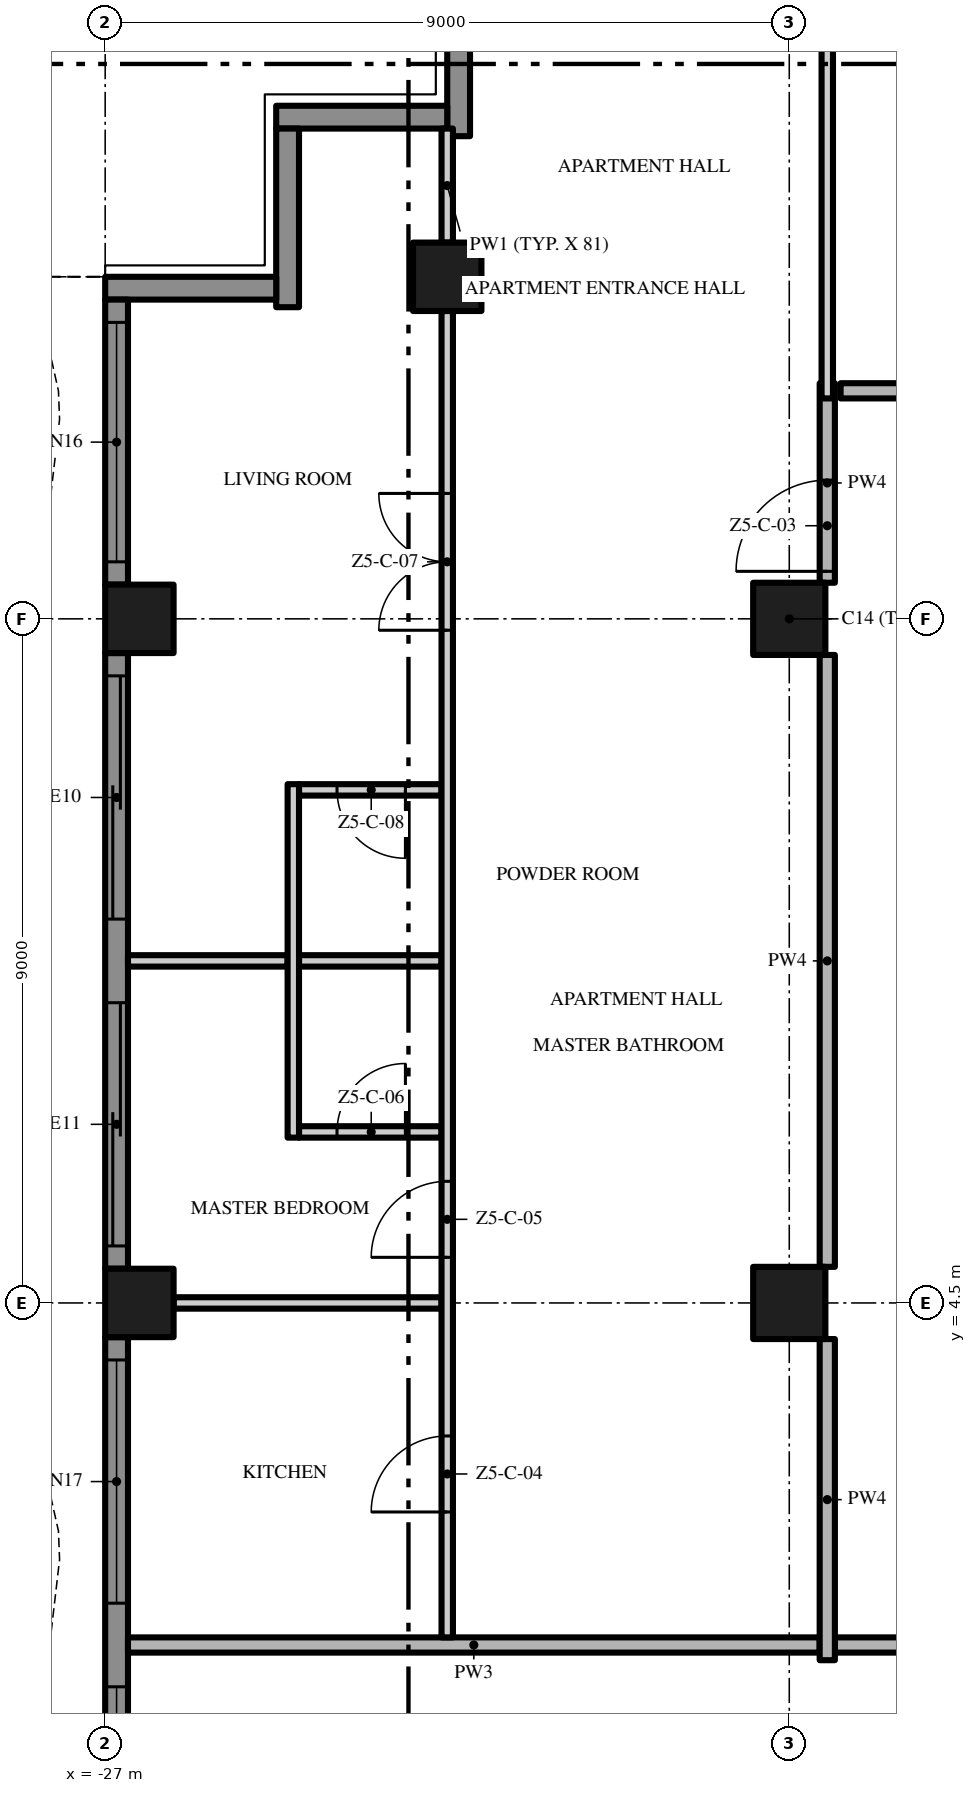
"""IFC4 building model, lengths in metres.
Left out: names, types, materials, properties, quantities, classifications, styles, units other than length and angle.
Written with IfcOpenShell. Run it as: python <this file> out.ifc"""

import sys

from ifc_helpers import new_model, si_unit, direction, frame, frame_2d, origin, origin_2d, place, context, subcontext, project, spatial, polyline, rectangle, outline, extrude, element, fill, save


model = new_model("IFC4")
c1 = context("Model", 3, precision=1e-05, world=origin(), true_north=direction((0.0, 1.0)))
c2 = subcontext(c1, "Body", "Model", "MODEL_VIEW")
j1 = project(units=[si_unit("LENGTHUNIT", "METRE"), si_unit("PLANEANGLEUNIT", "RADIAN")], contexts=[c1])
p1 = place(None, origin())
s1 = spatial("IfcSite", under=j1, at=p1, CompositionType="ELEMENT")
p2 = place(p1, origin())
s2 = spatial("IfcBuilding", under=s1, at=p2, CompositionType="ELEMENT")
p3 = place(p2, frame((0.0, 0.0, 261.6)))
s3 = spatial("IfcBuildingStorey", under=s2, at=p3, CompositionType="ELEMENT", Elevation=261.6)
for number, where, z_axis, x_axis in (
    (1, (-18.0, 13.5, 0.0), (0.0, 0.0, 1.0), (1.0, 0.0, 0.0)),
    (2, (-18.0, 4.5, 0.0), (0.0, 0.0, 1.0), (1.0, 0.0, 0.0)),
):
    element("IfcColumn", number, at=place(p3, frame(where, z_axis=z_axis, x_axis=x_axis)), inside=s3, PredefinedType="COLUMN", context=c2, shape_type="SweptSolid", body=[
        extrude(rectangle(XDim=0.95, YDim=0.95, at=origin_2d()), origin(), (0.0, 0.0, 1.0), 3.5),
    ])
for number, where, z_axis, x_axis in (
    (3, (-26.55, 13.5, 0.0), (0.0, 0.0, 1.0), (1.0, 0.0, 0.0)),
    (4, (-22.5, 18.0, 0.0), (0.0, 0.0, 1.0), (1.0, 0.0, 0.0)),
    (5, (-26.55, 4.5, 0.0), (0.0, 0.0, 1.0), (1.0, 0.0, 0.0)),
):
    element("IfcColumn", number, at=place(p3, frame(where, z_axis=z_axis, x_axis=x_axis)), inside=s3, PredefinedType="COLUMN", context=c2, shape_type="SweptSolid", body=[
        extrude(rectangle(XDim=0.9, YDim=0.9, at=origin_2d()), origin(), (0.0, 0.0, 1.0), 3.5),
    ])
p4 = place(p3, frame((-22.35, 19.85, 0.0), z_axis=(0.0, 0.0, 1.0), x_axis=(0.0, 1.0, 0.0)))
e6 = element("IfcWall", 6, at=p4, inside=s3, PredefinedType="SOLIDWALL", context=c2, shape_type="SweptSolid", body=[
    extrude(rectangle(XDim=2.35, YDim=0.3, at=frame_2d((1.175, 0.0))), origin(), (0.0, 0.0, 1.0), 3.5),
])
p5 = place(p3, frame((-24.75, 20.1, 0.0), z_axis=(0.0, 0.0, 1.0), x_axis=(1.0, 0.0, 0.0)))
e7 = element("IfcWall", 7, at=p5, inside=s3, PredefinedType="SOLIDWALL", context=c2, shape_type="SweptSolid", body=[
    extrude(rectangle(XDim=2.25, YDim=0.3, at=frame_2d((1.125, 0.0))), origin(), (0.0, 0.0, 1.0), 3.5),
])
p6 = place(p3, frame((-24.6, 17.6, 0.0), z_axis=(0.0, 0.0, 1.0), x_axis=(0.0, 1.0, 0.0)))
e8 = element("IfcWall", 8, at=p6, inside=s3, PredefinedType="SOLIDWALL", context=c2, shape_type="SweptSolid", body=[
    extrude(rectangle(XDim=2.35, YDim=0.3, at=frame_2d((1.175, 0.0))), origin(), (0.0, 0.0, 1.0), 3.5),
])
p7 = place(p3, frame((-27.0, 17.85, 0.0), z_axis=(0.0, 0.0, 1.0), x_axis=(1.0, 0.0, 0.0)))
e9 = element("IfcWall", 9, at=p7, inside=s3, PredefinedType="SOLIDWALL", context=c2, shape_type="SweptSolid", body=[
    extrude(rectangle(XDim=2.25, YDim=0.3, at=frame_2d((1.125, 0.0))), origin(), (0.0, 0.0, 1.0), 3.5),
])
p8 = place(p3, frame((-26.85, 13.95, 0.0), z_axis=(0.0, 0.0, 1.0), x_axis=(0.0, 1.0, 0.0)))
e10 = element("IfcWall", 10, at=p8, inside=s3, PredefinedType="SOLIDWALL", context=c2, shape_type="SweptSolid", body=[
    extrude(rectangle(XDim=3.75, YDim=0.3, at=frame_2d((1.875, 0.0))), origin(), (0.0, 0.0, 1.0), 3.5),
])
p9 = place(p8, frame((0.3, 0.0, 0.45)))
e11 = element("IfcOpeningElement", 11, at=p9, cuts=e10, PredefinedType="OPENING", context=c2, shape_type="SweptSolid", body=[
    extrude(rectangle(XDim=3.15, YDim=2.65, at=frame_2d((1.575, 1.325))), frame((0.0, 0.16, 0.0), z_axis=(0.0, -1.0, 0.0), x_axis=(1.0, 0.0, 0.0)), (0.0, 0.0, 1.0), 0.32),
])
p10 = place(p3, frame((-26.85, 4.95, 0.0), z_axis=(0.0, 0.0, 1.0), x_axis=(0.0, 1.0, 0.0)))
e12 = element("IfcWall", 12, at=p10, inside=s3, PredefinedType="SOLIDWALL", context=c2, shape_type="SweptSolid", body=[
    extrude(rectangle(XDim=8.1, YDim=0.3, at=frame_2d((4.05, 0.0))), origin(), (0.0, 0.0, 1.0), 3.5),
])
p11 = place(p10, frame((4.6, 0.0, 0.0)))
e13 = element("IfcOpeningElement", 13, at=p11, cuts=e12, PredefinedType="OPENING", context=c2, shape_type="SweptSolid", body=[
    extrude(rectangle(XDim=3.2, YDim=2.4, at=frame_2d((1.6, 1.2))), frame((0.0, 0.16, 0.0), z_axis=(0.0, -1.0, 0.0), x_axis=(1.0, 0.0, 0.0)), (0.0, 0.0, 1.0), 0.32),
])
p12 = place(p10, frame((0.3, 0.0, 0.0)))
e14 = element("IfcOpeningElement", 14, at=p12, cuts=e12, PredefinedType="OPENING", context=c2, shape_type="SweptSolid", body=[
    extrude(rectangle(XDim=3.2, YDim=2.4, at=frame_2d((1.6, 1.2))), frame((0.0, 0.16, 0.0), z_axis=(0.0, -1.0, 0.0), x_axis=(1.0, 0.0, 0.0)), (0.0, 0.0, 1.0), 0.32),
])
p13 = place(p3, frame((-26.85, -4.05, 0.0), z_axis=(0.0, 0.0, 1.0), x_axis=(0.0, 1.0, 0.0)))
e15 = element("IfcWall", 15, at=p13, inside=s3, PredefinedType="SOLIDWALL", context=c2, shape_type="SweptSolid", body=[
    extrude(rectangle(XDim=8.1, YDim=0.3, at=frame_2d((4.05, 0.0))), origin(), (0.0, 0.0, 1.0), 3.5),
])
p14 = place(p13, frame((4.6, 0.0, 0.45)))
e16 = element("IfcOpeningElement", 16, at=p14, cuts=e15, PredefinedType="OPENING", context=c2, shape_type="SweptSolid", body=[
    extrude(rectangle(XDim=3.2, YDim=2.65, at=frame_2d((1.6, 1.325))), frame((0.0, 0.16, 0.0), z_axis=(0.0, -1.0, 0.0), x_axis=(1.0, 0.0, 0.0)), (0.0, 0.0, 1.0), 0.32),
])
p15 = place(p13, frame((0.3, 0.0, 0.45)))
e17 = element("IfcOpeningElement", 17, at=p15, cuts=e15, PredefinedType="OPENING", context=c2, shape_type="SweptSolid", body=[
    extrude(rectangle(XDim=3.2, YDim=2.65, at=frame_2d((1.6, 1.325))), frame((0.0, 0.16, 0.0), z_axis=(0.0, -1.0, 0.0), x_axis=(1.0, 0.0, 0.0)), (0.0, 0.0, 1.0), 0.32),
])
p16 = place(p3, origin())
e18 = element("IfcWall", 18, at=p16, inside=s3, PredefinedType="USERDEFINED", context=c2, shape_type="SweptSolid", body=[
    extrude(outline(polyline([(-27.951, 18.0), (-27.615, 16.5), (-27.6, 16.125), (-27.731, 15.0), (-28.255, 13.5), (-28.988, 12.0), (-29.649, 10.5), (-29.985, 9.0), (-30.0, 8.625), (-29.869, 7.5), (-29.345, 6.0), (-28.612, 4.5), (-27.951, 3.0), (-27.615, 1.5), (-27.6, 1.125), (-27.731, 0.0), (-28.255, -1.5), (-28.988, -3.0), (-29.649, -4.5), (-29.985, -6.0), (-30.0, -6.375), (-29.869, -7.5), (-29.345, -9.0), (-28.612, -10.5), (-27.951, -12.0), (-27.615, -13.5), (-27.6, -13.875), (-27.731, -15.0), (-28.255, -16.5), (-28.988, -18.0), (-28.763, -18.11), (-28.024, -16.596), (-27.486, -15.056), (-27.349, -13.885), (-27.366, -13.467), (-27.713, -11.921), (-28.385, -10.395), (-29.114, -8.904), (-29.624, -7.444), (-29.749, -6.365), (-29.736, -6.033), (-29.41, -4.579), (-28.761, -3.105), (-28.024, -1.596), (-27.486, -0.056), (-27.349, 1.115), (-27.366, 1.533), (-27.713, 3.079), (-28.385, 4.605), (-29.114, 6.096), (-29.624, 7.556), (-29.749, 8.635), (-29.736, 8.967), (-29.41, 10.421), (-28.761, 11.895), (-28.024, 13.404), (-27.486, 14.944), (-27.349, 16.115), (-27.366, 16.533), (-27.708, 18.055), (-27.951, 18.0)])), origin(), (0.0, 0.0, 1.0), 0.9),
])
p17 = place(p3, frame((17.4, 0.0, 0.0), z_axis=(0.0, 0.0, 1.0), x_axis=(-1.0, 0.0, 0.0)))
e19 = element("IfcWall", 19, at=p17, inside=s3, PredefinedType="PARTITIONING", context=c2, shape_type="SweptSolid", body=[
    extrude(rectangle(XDim=34.8, YDim=0.2, at=frame_2d((17.4, 0.0))), origin(), (0.0, 0.0, 1.0), 3.5),
])
p18 = place(p17, frame((23.4, 0.0, 0.0)))
e20 = element("IfcOpeningElement", 20, at=p18, cuts=e19, PredefinedType="OPENING", context=c2, shape_type="SweptSolid", body=[
    extrude(rectangle(XDim=1.5, YDim=2.4, at=frame_2d((0.75, 1.2))), frame((0.0, 0.11, 0.0), z_axis=(0.0, -1.0, 0.0), x_axis=(1.0, 0.0, 0.0)), (0.0, 0.0, 1.0), 0.22),
])
p19 = place(p17, frame((5.4, 0.0, 0.0)))
e21 = element("IfcOpeningElement", 21, at=p19, cuts=e19, PredefinedType="OPENING", context=c2, shape_type="SweptSolid", body=[
    extrude(rectangle(XDim=1.5, YDim=2.4, at=frame_2d((0.75, 1.2))), frame((0.0, 0.11, 0.0), z_axis=(0.0, -1.0, 0.0), x_axis=(1.0, 0.0, 0.0)), (0.0, 0.0, 1.0), 0.22),
])
p20 = place(p3, frame((-26.7, 0.0, 0.0), z_axis=(0.0, 0.0, 1.0), x_axis=(1.0, 0.0, 0.0)))
e22 = element("IfcWall", 22, at=p20, inside=s3, PredefinedType="PARTITIONING", context=c2, shape_type="SweptSolid", body=[
    extrude(rectangle(XDim=9.1, YDim=0.2, at=frame_2d((4.55, 0.0))), origin(), (0.0, 0.0, 1.0), 3.5),
])
p21 = place(p3, frame((-26.1, 4.5, 0.0), z_axis=(0.0, 0.0, 1.0), x_axis=(1.0, 0.0, 0.0)))
e23 = element("IfcWall", 23, at=p21, inside=s3, PredefinedType="PARTITIONING", context=c2, shape_type="SweptSolid", body=[
    extrude(rectangle(XDim=3.525, YDim=0.15, at=frame_2d((1.762, 0.0))), origin(), (0.0, 0.0, 1.0), 3.5),
])
p22 = place(p3, frame((-24.45, 6.75, 0.0), z_axis=(0.0, 0.0, 1.0), x_axis=(1.0, 0.0, 0.0)))
e24 = element("IfcWall", 24, at=p22, inside=s3, PredefinedType="PARTITIONING", context=c2, shape_type="SweptSolid", body=[
    extrude(rectangle(XDim=1.875, YDim=0.15, at=frame_2d((0.938, 0.0))), origin(), (0.0, 0.0, 1.0), 3.5),
])
p23 = place(p22, frame((0.5, 0.0, 0.0)))
e25 = element("IfcOpeningElement", 25, at=p23, cuts=e24, PredefinedType="OPENING", context=c2, shape_type="SweptSolid", body=[
    extrude(rectangle(XDim=0.9, YDim=2.1, at=frame_2d((0.45, 1.05))), frame((0.0, 0.085, 0.0), z_axis=(0.0, -1.0, 0.0), x_axis=(1.0, 0.0, 0.0)), (0.0, 0.0, 1.0), 0.17),
])
p24 = place(p3, frame((-26.7, 9.0, 0.0), z_axis=(0.0, 0.0, 1.0), x_axis=(1.0, 0.0, 0.0)))
e26 = element("IfcWall", 26, at=p24, inside=s3, PredefinedType="PARTITIONING", context=c2, shape_type="SweptSolid", body=[
    extrude(rectangle(XDim=2.1, YDim=0.15, at=frame_2d((1.05, 0.0))), origin(), (0.0, 0.0, 1.0), 3.5),
])
p25 = place(p3, frame((-24.45, 9.0, 0.0), z_axis=(0.0, 0.0, 1.0), x_axis=(1.0, 0.0, 0.0)))
e27 = element("IfcWall", 27, at=p25, inside=s3, PredefinedType="PARTITIONING", context=c2, shape_type="SweptSolid", body=[
    extrude(rectangle(XDim=1.875, YDim=0.15, at=frame_2d((0.938, 0.0))), origin(), (0.0, 0.0, 1.0), 3.5),
])
p26 = place(p3, frame((-22.575, 11.25, 0.0), z_axis=(0.0, 0.0, 1.0), x_axis=(-1.0, 0.0, 0.0)))
e28 = element("IfcWall", 28, at=p26, inside=s3, PredefinedType="PARTITIONING", context=c2, shape_type="SweptSolid", body=[
    extrude(rectangle(XDim=1.875, YDim=0.15, at=frame_2d((0.938, 0.0))), origin(), (0.0, 0.0, 1.0), 3.5),
])
p27 = place(p26, frame((0.475, 0.0, 0.0)))
e29 = element("IfcOpeningElement", 29, at=p27, cuts=e28, PredefinedType="OPENING", context=c2, shape_type="SweptSolid", body=[
    extrude(rectangle(XDim=0.9, YDim=2.1, at=frame_2d((0.45, 1.05))), frame((0.0, 0.085, 0.0), z_axis=(0.0, -1.0, 0.0), x_axis=(1.0, 0.0, 0.0)), (0.0, 0.0, 1.0), 0.17),
])
p28 = place(p3, frame((-17.325, 16.5, 0.0), z_axis=(0.0, 0.0, 1.0), x_axis=(1.0, 0.0, 0.0)))
e30 = element("IfcWall", 30, at=p28, inside=s3, PredefinedType="PARTITIONING", context=c2, shape_type="SweptSolid", body=[
    extrude(rectangle(XDim=3.825, YDim=0.2, at=frame_2d((1.913, 0.0))), origin(), (0.0, 0.0, 1.0), 3.5),
])
p29 = place(p28, frame((1.35, 0.0, 0.0)))
e31 = element("IfcOpeningElement", 31, at=p29, cuts=e30, PredefinedType="OPENING", context=c2, shape_type="SweptSolid", body=[
    extrude(rectangle(XDim=0.9, YDim=2.1, at=frame_2d((0.45, 1.05))), frame((0.0, 0.11, 0.0), z_axis=(0.0, -1.0, 0.0), x_axis=(1.0, 0.0, 0.0)), (0.0, 0.0, 1.0), 0.22),
])
p30 = place(p3, frame((-24.525, 6.675, 0.0), z_axis=(0.0, 0.0, 1.0), x_axis=(0.0, 1.0, 0.0)))
e32 = element("IfcWall", 32, at=p30, inside=s3, PredefinedType="PARTITIONING", context=c2, shape_type="SweptSolid", body=[
    extrude(rectangle(XDim=4.65, YDim=0.15, at=frame_2d((2.325, 0.0))), origin(), (0.0, 0.0, 1.0), 3.5),
])
p31 = place(p3, frame((-22.5, 0.1, 0.0), z_axis=(0.0, 0.0, 1.0), x_axis=(0.0, 1.0, 0.0)))
e33 = element("IfcWall", 33, at=p31, inside=s3, PredefinedType="PARTITIONING", context=c2, shape_type="SweptSolid", body=[
    extrude(rectangle(XDim=17.45, YDim=0.15, at=frame_2d((8.725, 0.0))), origin(), (0.0, 0.0, 1.0), 3.5),
])
p32 = place(p31, frame((1.65, 0.0, 0.0)))
e34 = element("IfcOpeningElement", 34, at=p32, cuts=e33, PredefinedType="OPENING", context=c2, shape_type="SweptSolid", body=[
    extrude(rectangle(XDim=1.0, YDim=2.4, at=frame_2d((0.5, 1.2))), frame((0.0, 0.085, 0.0), z_axis=(0.0, -1.0, 0.0), x_axis=(1.0, 0.0, 0.0)), (0.0, 0.0, 1.0), 0.17),
])
p33 = place(p31, frame((5.0, 0.0, 0.0)))
e35 = element("IfcOpeningElement", 35, at=p33, cuts=e33, PredefinedType="OPENING", context=c2, shape_type="SweptSolid", body=[
    extrude(rectangle(XDim=1.0, YDim=2.4, at=frame_2d((0.5, 1.2))), frame((0.0, 0.085, 0.0), z_axis=(0.0, -1.0, 0.0), x_axis=(1.0, 0.0, 0.0)), (0.0, 0.0, 1.0), 0.17),
])
p34 = place(p31, frame((13.25, 0.0, 0.0)))
e36 = element("IfcOpeningElement", 36, at=p34, cuts=e33, PredefinedType="OPENING", context=c2, shape_type="SweptSolid", body=[
    extrude(rectangle(XDim=1.8, YDim=2.4, at=frame_2d((0.9, 1.2))), frame((0.0, 0.085, 0.0), z_axis=(0.0, -1.0, 0.0), x_axis=(1.0, 0.0, 0.0)), (0.0, 0.0, 1.0), 0.17),
])
p35 = place(p3, frame((-22.5, 18.45, 0.0), z_axis=(0.0, 0.0, 1.0), x_axis=(0.0, 1.0, 0.0)))
e37 = element("IfcWall", 37, at=p35, inside=s3, PredefinedType="PARTITIONING", context=c2, shape_type="SweptSolid", body=[
    extrude(rectangle(XDim=1.5, YDim=0.15, at=frame_2d((0.75, 0.0))), origin(), (0.0, 0.0, 1.0), 3.5),
])
p36 = place(p3, frame((-17.5, -0.2, 0.0), z_axis=(0.0, 0.0, 1.0), x_axis=(0.0, 1.0, 0.0)))
e38 = element("IfcWall", 38, at=p36, inside=s3, PredefinedType="PARTITIONING", context=c2, shape_type="SweptSolid", body=[
    extrude(rectangle(XDim=4.225, YDim=0.2, at=frame_2d((2.112, 0.0))), origin(), (0.0, 0.0, 1.0), 3.5),
])
p37 = place(p3, frame((-17.5, 4.975, 0.0), z_axis=(0.0, 0.0, 1.0), x_axis=(0.0, 1.0, 0.0)))
e39 = element("IfcWall", 39, at=p37, inside=s3, PredefinedType="PARTITIONING", context=c2, shape_type="SweptSolid", body=[
    extrude(rectangle(XDim=8.05, YDim=0.2, at=frame_2d((4.025, 0.0))), origin(), (0.0, 0.0, 1.0), 3.5),
])
p38 = place(p3, frame((-17.5, 13.975, 0.0), z_axis=(0.0, 0.0, 1.0), x_axis=(0.0, 1.0, 0.0)))
e40 = element("IfcWall", 40, at=p38, inside=s3, PredefinedType="PARTITIONING", context=c2, shape_type="SweptSolid", body=[
    extrude(rectangle(XDim=2.625, YDim=0.2, at=frame_2d((1.312, 0.0))), origin(), (0.0, 0.0, 1.0), 3.5),
])
p39 = place(p38, frame((0.15, 0.0, 0.0)))
e41 = element("IfcOpeningElement", 41, at=p39, cuts=e40, PredefinedType="OPENING", context=c2, shape_type="SweptSolid", body=[
    extrude(rectangle(XDim=1.2, YDim=2.4, at=frame_2d((0.6, 1.2))), frame((0.0, 0.11, 0.0), z_axis=(0.0, -1.0, 0.0), x_axis=(1.0, 0.0, 0.0)), (0.0, 0.0, 1.0), 0.22),
])
p40 = place(p3, frame((-17.5, 16.4, 0.0), z_axis=(0.0, 0.0, 1.0), x_axis=(0.0, 1.0, 0.0)))
e42 = element("IfcWall", 42, at=p40, inside=s3, PredefinedType="PARTITIONING", context=c2, shape_type="SweptSolid", body=[
    extrude(rectangle(XDim=5.2, YDim=0.15, at=frame_2d((2.6, 0.0))), origin(), (0.0, 0.0, 1.0), 3.5),
])
p41 = place(p9, origin())
e43 = element("IfcWindow", 43, at=p41, inside=s3, PartitioningType="SINGLE_PANEL", PredefinedType="WINDOW", context=c2, shape_type="SweptSolid", body=[
    extrude(rectangle(XDim=3.15, YDim=2.65, at=frame_2d((1.575, 1.325))), frame((0.0, 0.03, 0.0), z_axis=(0.0, -1.0, 0.0), x_axis=(1.0, 0.0, 0.0)), (0.0, 0.0, 1.0), 0.06),
])
fill(e11, e43)
p42 = place(p11, origin())
e44 = element("IfcDoor", 44, at=p42, inside=s3, OperationType="SINGLE_SWING_LEFT", PredefinedType="DOOR", context=c2, shape_type="SweptSolid", body=[
    extrude(rectangle(XDim=3.2, YDim=2.4, at=frame_2d((1.6, 1.2))), frame((0.0, 0.025, 0.0), z_axis=(0.0, -1.0, 0.0), x_axis=(1.0, 0.0, 0.0)), (0.0, 0.0, 1.0), 0.05),
])
fill(e13, e44)
p43 = place(p12, origin())
e45 = element("IfcDoor", 45, at=p43, inside=s3, OperationType="SINGLE_SWING_LEFT", PredefinedType="DOOR", context=c2, shape_type="SweptSolid", body=[
    extrude(rectangle(XDim=3.2, YDim=2.4, at=frame_2d((1.6, 1.2))), frame((0.0, 0.025, 0.0), z_axis=(0.0, -1.0, 0.0), x_axis=(1.0, 0.0, 0.0)), (0.0, 0.0, 1.0), 0.05),
])
fill(e14, e45)
p44 = place(p14, origin())
e46 = element("IfcWindow", 46, at=p44, inside=s3, PartitioningType="SINGLE_PANEL", PredefinedType="WINDOW", context=c2, shape_type="SweptSolid", body=[
    extrude(rectangle(XDim=3.2, YDim=2.65, at=frame_2d((1.6, 1.325))), frame((0.0, 0.03, 0.0), z_axis=(0.0, -1.0, 0.0), x_axis=(1.0, 0.0, 0.0)), (0.0, 0.0, 1.0), 0.06),
])
fill(e16, e46)
p45 = place(p15, origin())
e47 = element("IfcWindow", 47, at=p45, inside=s3, PartitioningType="SINGLE_PANEL", PredefinedType="WINDOW", context=c2, shape_type="SweptSolid", body=[
    extrude(rectangle(XDim=3.2, YDim=2.65, at=frame_2d((1.6, 1.325))), frame((0.0, 0.03, 0.0), z_axis=(0.0, -1.0, 0.0), x_axis=(1.0, 0.0, 0.0)), (0.0, 0.0, 1.0), 0.06),
])
fill(e17, e47)
p46 = place(p39, origin())
e48 = element("IfcDoor", 48, at=p46, inside=s3, OperationType="SINGLE_SWING_LEFT", PredefinedType="DOOR", context=c2, shape_type="SweptSolid", body=[
    extrude(rectangle(XDim=1.2, YDim=2.4, at=frame_2d((0.6, 1.2))), frame((0.0, 0.025, 0.0), z_axis=(0.0, -1.0, 0.0), x_axis=(1.0, 0.0, 0.0)), (0.0, 0.0, 1.0), 0.05),
])
fill(e41, e48)
p47 = place(p32, origin())
e49 = element("IfcDoor", 49, at=p47, inside=s3, OperationType="SINGLE_SWING_LEFT", PredefinedType="DOOR", context=c2, shape_type="SweptSolid", body=[
    extrude(rectangle(XDim=1.0, YDim=2.4, at=frame_2d((0.5, 1.2))), frame((0.0, 0.025, 0.0), z_axis=(0.0, -1.0, 0.0), x_axis=(1.0, 0.0, 0.0)), (0.0, 0.0, 1.0), 0.05),
])
fill(e34, e49)
p48 = place(p33, origin())
e50 = element("IfcDoor", 50, at=p48, inside=s3, OperationType="SINGLE_SWING_LEFT", PredefinedType="DOOR", context=c2, shape_type="SweptSolid", body=[
    extrude(rectangle(XDim=1.0, YDim=2.4, at=frame_2d((0.5, 1.2))), frame((0.0, 0.025, 0.0), z_axis=(0.0, -1.0, 0.0), x_axis=(1.0, 0.0, 0.0)), (0.0, 0.0, 1.0), 0.05),
])
fill(e35, e50)
p49 = place(p23, origin())
e51 = element("IfcDoor", 51, at=p49, inside=s3, OperationType="SINGLE_SWING_RIGHT", PredefinedType="DOOR", context=c2, shape_type="SweptSolid", body=[
    extrude(rectangle(XDim=0.9, YDim=2.1, at=frame_2d((0.45, 1.05))), frame((0.0, 0.025, 0.0), z_axis=(0.0, -1.0, 0.0), x_axis=(1.0, 0.0, 0.0)), (0.0, 0.0, 1.0), 0.05),
])
fill(e25, e51)
p50 = place(p34, origin())
e52 = element("IfcDoor", 52, at=p50, inside=s3, OperationType="DOUBLE_DOOR_SINGLE_SWING", PredefinedType="DOOR", context=c2, shape_type="SweptSolid", body=[
    extrude(rectangle(XDim=1.8, YDim=2.4, at=frame_2d((0.9, 1.2))), frame((0.0, 0.025, 0.0), z_axis=(0.0, -1.0, 0.0), x_axis=(1.0, 0.0, 0.0)), (0.0, 0.0, 1.0), 0.05),
])
fill(e36, e52)
p51 = place(p27, origin())
e53 = element("IfcDoor", 53, at=p51, inside=s3, OperationType="SINGLE_SWING_LEFT", PredefinedType="DOOR", context=c2, shape_type="SweptSolid", body=[
    extrude(rectangle(XDim=0.9, YDim=2.1, at=frame_2d((0.45, 1.05))), frame((0.0, 0.025, 0.0), z_axis=(0.0, -1.0, 0.0), x_axis=(1.0, 0.0, 0.0)), (0.0, 0.0, 1.0), 0.05),
])
fill(e29, e53)
save(model, sys.argv[1])
